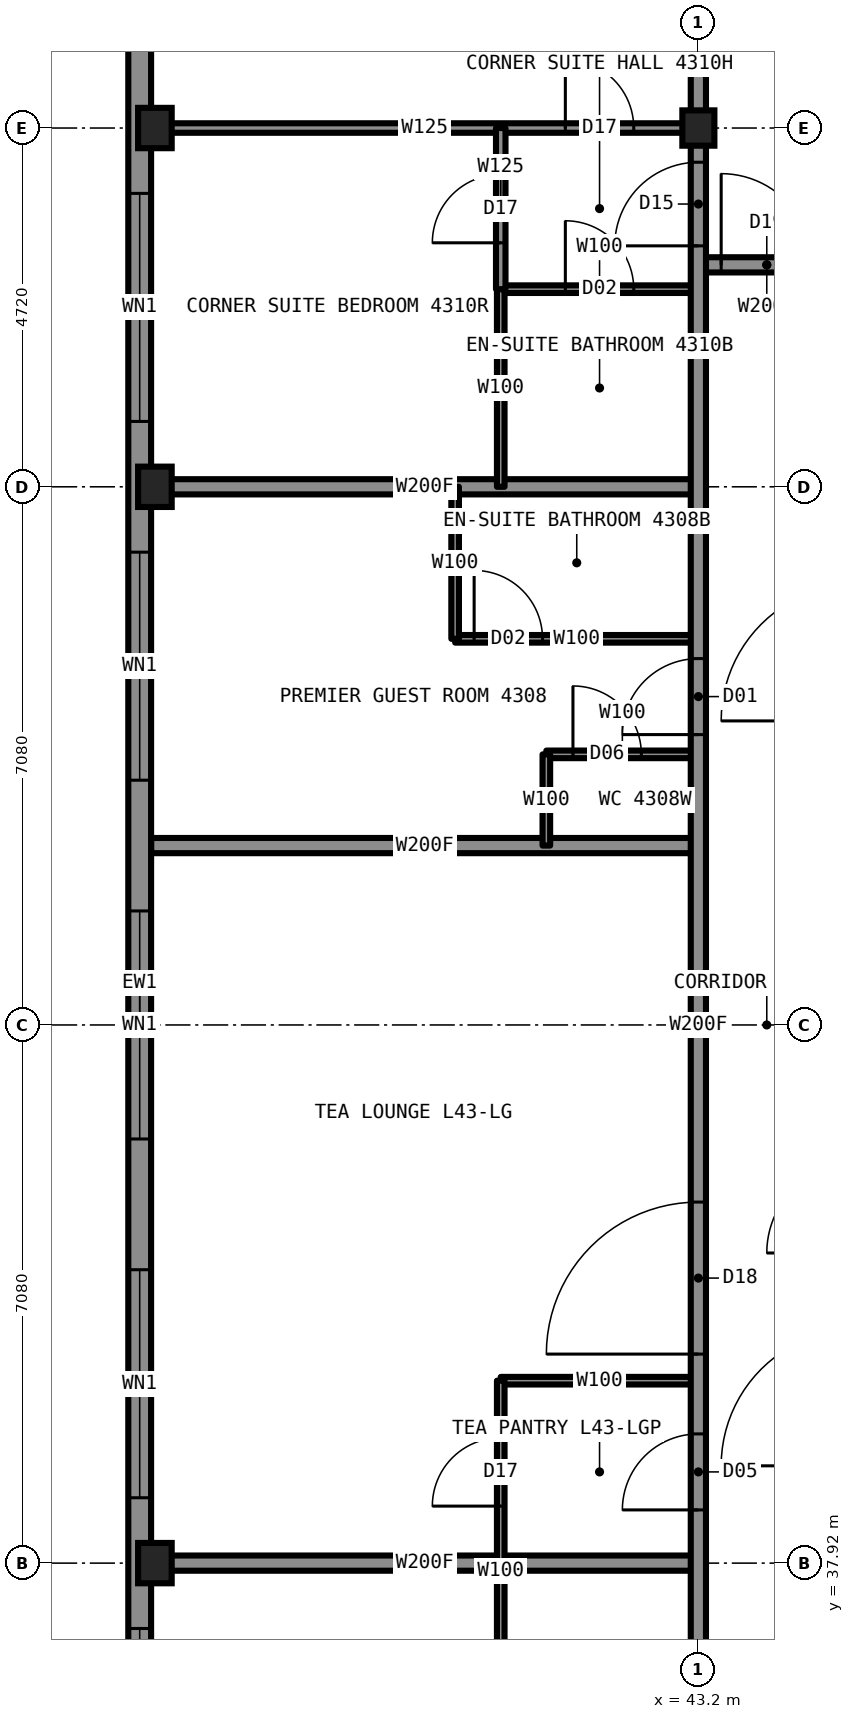
"""IFC4 building model, lengths in metres.
Left out: names, types, materials, properties, quantities, classifications, styles, units other than length and angle.
Written with IfcOpenShell. Run it as: python <this file> out.ifc"""

import sys

from ifc_helpers import new_model, si_unit, direction, frame, frame_2d, origin, origin_2d, place, context, subcontext, project, spatial, rectangle, i_section, extrude, element, fill, save


model = new_model("IFC4")
c1 = context("Model", 3, precision=1e-05, world=origin(), true_north=direction((0.0, 1.0)))
c2 = subcontext(c1, "Body", "Model", "MODEL_VIEW")
j1 = project(units=[si_unit("LENGTHUNIT", "METRE"), si_unit("PLANEANGLEUNIT", "RADIAN")], contexts=[c1])
p1 = place(None, origin())
s1 = spatial("IfcSite", under=j1, at=p1, CompositionType="ELEMENT")
p2 = place(p1, origin())
s2 = spatial("IfcBuilding", under=s1, at=p2, CompositionType="ELEMENT")
p3 = place(p2, frame((0.0, 0.0, 161.8)))
s3 = spatial("IfcBuildingStorey", under=s2, at=p3, CompositionType="ELEMENT", Elevation=161.8)
for number, where, z_axis, x_axis in (
    (1, (36.05, 37.92, 0.0), (0.0, 0.0, 1.0), (1.0, 0.0, 0.0)),
    (2, (36.05, 52.08, 0.0), (0.0, 0.0, 1.0), (1.0, 0.0, 0.0)),
    (3, (36.05, 56.8, 0.0), (0.0, 0.0, 1.0), (1.0, 0.0, 0.0)),
):
    element("IfcColumn", number, at=place(p3, frame(where, z_axis=z_axis, x_axis=x_axis)), inside=s3, PredefinedType="COLUMN", context=c2, shape_type="SweptSolid", body=[
        extrude(i_section(OverallWidth=0.442, OverallDepth=0.531, WebThickness=0.066, FlangeThickness=0.106, at=origin_2d()), origin(), (0.0, 0.0, 1.0), 3.5),
    ])
p4 = place(p3, frame((43.2, 56.8, 0.0), z_axis=(0.0, 0.0, 1.0), x_axis=(1.0, 0.0, 0.0)))
e4 = element("IfcColumn", 4, at=p4, inside=s3, PredefinedType="COLUMN", context=c2, shape_type="SweptSolid", body=[
    extrude(i_section(OverallWidth=0.422, OverallDepth=0.465, WebThickness=0.045, FlangeThickness=0.073, at=origin_2d()), origin(), (0.0, 0.0, 1.0), 3.5),
])
p5 = place(p3, frame((40.6, 40.32, 0.0), z_axis=(0.0, 0.0, 1.0), x_axis=(1.0, 0.0, 0.0)))
e5 = element("IfcWall", 5, at=p5, inside=s3, PredefinedType="PARTITIONING", context=c2, shape_type="SweptSolid", body=[
    extrude(rectangle(XDim=2.6, YDim=0.1, at=frame_2d((1.3, 0.0))), origin(), (0.0, 0.0, 1.0), 2.73),
])
p6 = place(p3, frame((36.0, 37.92, 0.0), z_axis=(0.0, 0.0, 1.0), x_axis=(1.0, 0.0, 0.0)))
e6 = element("IfcWall", 6, at=p6, inside=s3, PredefinedType="PARTITIONING", context=c2, shape_type="SweptSolid", body=[
    extrude(rectangle(XDim=7.2, YDim=0.2, at=frame_2d((3.6, 0.0))), origin(), (0.0, 0.0, 1.0), 2.573),
])
p7 = place(p3, frame((43.2, 55.0, 0.0), z_axis=(0.0, 0.0, 1.0), x_axis=(1.0, 0.0, 0.0)))
e7 = element("IfcWall", 7, at=p7, inside=s3, PredefinedType="PARTITIONING", context=c2, shape_type="SweptSolid", body=[
    extrude(rectangle(XDim=1.8, YDim=0.2, at=frame_2d((0.9, 0.0))), origin(), (0.0, 0.0, 1.0), 3.33),
])
p8 = place(p7, frame((0.3, 0.0, 0.0)))
e8 = element("IfcOpeningElement", 8, at=p8, cuts=e7, PredefinedType="OPENING", context=c2, shape_type="SweptSolid", body=[
    extrude(rectangle(XDim=1.2, YDim=2.2, at=frame_2d((0.6, 1.1))), frame((0.0, 0.11, 0.0), z_axis=(0.0, -1.0, 0.0), x_axis=(1.0, 0.0, 0.0)), (0.0, 0.0, 1.0), 0.22),
])
p9 = place(p3, frame((36.0, 56.8, 0.0), z_axis=(0.0, 0.0, 1.0), x_axis=(1.0, 0.0, 0.0)))
e9 = element("IfcWall", 9, at=p9, inside=s3, PredefinedType="PARTITIONING", context=c2, shape_type="SweptSolid", body=[
    extrude(rectangle(XDim=7.2, YDim=0.125, at=frame_2d((3.6, 0.0))), origin(), (0.0, 0.0, 1.0), 2.573),
])
p10 = place(p9, frame((5.45, 0.0, 0.0)))
e10 = element("IfcOpeningElement", 10, at=p10, cuts=e9, PredefinedType="OPENING", context=c2, shape_type="SweptSolid", body=[
    extrude(rectangle(XDim=0.9, YDim=2.2, at=frame_2d((0.45, 1.1))), frame((0.0, 0.073, 0.0), z_axis=(0.0, -1.0, 0.0), x_axis=(1.0, 0.0, 0.0)), (0.0, 0.0, 1.0), 0.145),
])
p11 = place(p3, frame((36.0, 47.36, 0.0), z_axis=(0.0, 0.0, 1.0), x_axis=(1.0, 0.0, 0.0)))
e11 = element("IfcWall", 11, at=p11, inside=s3, PredefinedType="PARTITIONING", context=c2, shape_type="SweptSolid", body=[
    extrude(rectangle(XDim=7.2, YDim=0.2, at=frame_2d((3.6, 0.0))), origin(), (0.0, 0.0, 1.0), 2.73),
])
p12 = place(p3, frame((41.2, 48.56, 0.0), z_axis=(0.0, 0.0, 1.0), x_axis=(1.0, 0.0, 0.0)))
e12 = element("IfcWall", 12, at=p12, inside=s3, PredefinedType="PARTITIONING", context=c2, shape_type="SweptSolid", body=[
    extrude(rectangle(XDim=2.0, YDim=0.1, at=frame_2d((1.0, 0.0))), origin(), (0.0, 0.0, 1.0), 3.33),
])
p13 = place(p12, frame((0.35, 0.0, 0.0)))
e13 = element("IfcOpeningElement", 13, at=p13, cuts=e12, PredefinedType="OPENING", context=c2, shape_type="SweptSolid", body=[
    extrude(rectangle(XDim=0.9, YDim=2.1, at=frame_2d((0.45, 1.05))), frame((0.0, 0.06, 0.0), z_axis=(0.0, -1.0, 0.0), x_axis=(1.0, 0.0, 0.0)), (0.0, 0.0, 1.0), 0.12),
])
p14 = place(p3, frame((40.0, 50.08, 0.0), z_axis=(0.0, 0.0, 1.0), x_axis=(1.0, 0.0, 0.0)))
e14 = element("IfcWall", 14, at=p14, inside=s3, PredefinedType="PARTITIONING", context=c2, shape_type="SweptSolid", body=[
    extrude(rectangle(XDim=3.2, YDim=0.1, at=frame_2d((1.6, 0.0))), origin(), (0.0, 0.0, 1.0), 3.33),
])
p15 = place(p14, frame((0.25, 0.0, 0.0)))
e15 = element("IfcOpeningElement", 15, at=p15, cuts=e14, PredefinedType="OPENING", context=c2, shape_type="SweptSolid", body=[
    extrude(rectangle(XDim=0.9, YDim=2.1, at=frame_2d((0.45, 1.05))), frame((0.0, 0.06, 0.0), z_axis=(0.0, -1.0, 0.0), x_axis=(1.0, 0.0, 0.0)), (0.0, 0.0, 1.0), 0.12),
])
p16 = place(p3, frame((36.0, 52.08, 0.0), z_axis=(0.0, 0.0, 1.0), x_axis=(1.0, 0.0, 0.0)))
e16 = element("IfcWall", 16, at=p16, inside=s3, PredefinedType="PARTITIONING", context=c2, shape_type="SweptSolid", body=[
    extrude(rectangle(XDim=7.2, YDim=0.2, at=frame_2d((3.6, 0.0))), origin(), (0.0, 0.0, 1.0), 2.573),
])
p17 = place(p3, frame((40.6, 54.68, 0.0), z_axis=(0.0, 0.0, 1.0), x_axis=(1.0, 0.0, 0.0)))
e17 = element("IfcWall", 17, at=p17, inside=s3, PredefinedType="PARTITIONING", context=c2, shape_type="SweptSolid", body=[
    extrude(rectangle(XDim=2.6, YDim=0.1, at=frame_2d((1.3, 0.0))), origin(), (0.0, 0.0, 1.0), 3.33),
])
p18 = place(p17, frame((0.85, 0.0, 0.0)))
e18 = element("IfcOpeningElement", 18, at=p18, cuts=e17, PredefinedType="OPENING", context=c2, shape_type="SweptSolid", body=[
    extrude(rectangle(XDim=0.9, YDim=2.1, at=frame_2d((0.45, 1.05))), frame((0.0, 0.06, 0.0), z_axis=(0.0, -1.0, 0.0), x_axis=(1.0, 0.0, 0.0)), (0.0, 0.0, 1.0), 0.12),
])
p19 = place(p3, frame((43.2, 33.22, 0.0), z_axis=(0.0, 0.0, 1.0), x_axis=(0.0, 1.0, 0.0)))
e19 = element("IfcWall", 19, at=p19, inside=s3, PredefinedType="PARTITIONING", context=c2, shape_type="SweptSolid", body=[
    extrude(rectangle(XDim=23.56, YDim=0.2, at=frame_2d((11.78, 0.0))), origin(), (0.0, 0.0, 1.0), 3.33),
])
p20 = place(p19, frame((15.6, 0.0, 0.0)))
e20 = element("IfcOpeningElement", 20, at=p20, cuts=e19, PredefinedType="OPENING", context=c2, shape_type="SweptSolid", body=[
    extrude(rectangle(XDim=1.0, YDim=2.2, at=frame_2d((0.5, 1.1))), frame((0.0, 0.11, 0.0), z_axis=(0.0, -1.0, 0.0), x_axis=(1.0, 0.0, 0.0)), (0.0, 0.0, 1.0), 0.22),
])
p21 = place(p19, frame((22.03, 0.0, 0.0)))
e21 = element("IfcOpeningElement", 21, at=p21, cuts=e19, PredefinedType="OPENING", context=c2, shape_type="SweptSolid", body=[
    extrude(rectangle(XDim=1.1, YDim=2.2, at=frame_2d((0.55, 1.1))), frame((0.0, 0.11, 0.0), z_axis=(0.0, -1.0, 0.0), x_axis=(1.0, 0.0, 0.0)), (0.0, 0.0, 1.0), 0.22),
])
p22 = place(p19, frame((0.64, 0.0, 0.0)))
e22 = element("IfcOpeningElement", 22, at=p22, cuts=e19, PredefinedType="OPENING", context=c2, shape_type="SweptSolid", body=[
    extrude(rectangle(XDim=1.1, YDim=2.2, at=frame_2d((0.55, 1.1))), frame((0.0, 0.11, 0.0), z_axis=(0.0, -1.0, 0.0), x_axis=(1.0, 0.0, 0.0)), (0.0, 0.0, 1.0), 0.22),
])
p23 = place(p19, frame((7.45, 0.0, 0.0)))
e23 = element("IfcOpeningElement", 23, at=p23, cuts=e19, PredefinedType="OPENING", context=c2, shape_type="SweptSolid", body=[
    extrude(rectangle(XDim=2.0, YDim=2.4, at=frame_2d((1.0, 1.2))), frame((0.0, 0.11, 0.0), z_axis=(0.0, -1.0, 0.0), x_axis=(1.0, 0.0, 0.0)), (0.0, 0.0, 1.0), 0.22),
])
p24 = place(p19, frame((5.4, 0.0, 0.0)))
e24 = element("IfcOpeningElement", 24, at=p24, cuts=e19, PredefinedType="OPENING", context=c2, shape_type="SweptSolid", body=[
    extrude(rectangle(XDim=1.0, YDim=2.1, at=frame_2d((0.5, 1.05))), frame((0.0, 0.11, 0.0), z_axis=(0.0, -1.0, 0.0), x_axis=(1.0, 0.0, 0.0)), (0.0, 0.0, 1.0), 0.22),
])
p25 = place(p3, frame((41.2, 47.36, 0.0), z_axis=(0.0, 0.0, 1.0), x_axis=(0.0, 1.0, 0.0)))
e25 = element("IfcWall", 25, at=p25, inside=s3, PredefinedType="PARTITIONING", context=c2, shape_type="SweptSolid", body=[
    extrude(rectangle(XDim=1.2, YDim=0.1, at=frame_2d((0.6, 0.0))), origin(), (0.0, 0.0, 1.0), 3.33),
])
p26 = place(p3, frame((40.6, 35.32, 0.0), z_axis=(0.0, 0.0, 1.0), x_axis=(0.0, 1.0, 0.0)))
e26 = element("IfcWall", 26, at=p26, inside=s3, PredefinedType="PARTITIONING", context=c2, shape_type="SweptSolid", body=[
    extrude(rectangle(XDim=5.0, YDim=0.1, at=frame_2d((2.5, 0.0))), origin(), (0.0, 0.0, 1.0), 3.33),
])
p27 = place(p26, frame((3.35, 0.0, 0.0)))
e27 = element("IfcOpeningElement", 27, at=p27, cuts=e26, PredefinedType="OPENING", context=c2, shape_type="SweptSolid", body=[
    extrude(rectangle(XDim=0.9, YDim=2.2, at=frame_2d((0.45, 1.1))), frame((0.0, 0.06, 0.0), z_axis=(0.0, -1.0, 0.0), x_axis=(1.0, 0.0, 0.0)), (0.0, 0.0, 1.0), 0.12),
])
p28 = place(p3, frame((40.6, 52.08, 0.0), z_axis=(0.0, 0.0, 1.0), x_axis=(0.0, 1.0, 0.0)))
e28 = element("IfcWall", 28, at=p28, inside=s3, PredefinedType="PARTITIONING", context=c2, shape_type="SweptSolid", body=[
    extrude(rectangle(XDim=2.6, YDim=0.1, at=frame_2d((1.3, 0.0))), origin(), (0.0, 0.0, 1.0), 3.33),
])
p29 = place(p3, frame((40.6, 54.68, 0.0), z_axis=(0.0, 0.0, 1.0), x_axis=(0.0, 1.0, 0.0)))
e29 = element("IfcWall", 29, at=p29, inside=s3, PredefinedType="PARTITIONING", context=c2, shape_type="SweptSolid", body=[
    extrude(rectangle(XDim=2.12, YDim=0.125, at=frame_2d((1.06, 0.0))), origin(), (0.0, 0.0, 1.0), 3.33),
])
p30 = place(p29, frame((0.61, 0.0, 0.0)))
e30 = element("IfcOpeningElement", 30, at=p30, cuts=e29, PredefinedType="OPENING", context=c2, shape_type="SweptSolid", body=[
    extrude(rectangle(XDim=0.9, YDim=2.2, at=frame_2d((0.45, 1.1))), frame((0.0, 0.073, 0.0), z_axis=(0.0, -1.0, 0.0), x_axis=(1.0, 0.0, 0.0)), (0.0, 0.0, 1.0), 0.145),
])
p31 = place(p3, frame((40.0, 50.08, 0.0), z_axis=(0.0, 0.0, 1.0), x_axis=(0.0, 1.0, 0.0)))
e31 = element("IfcWall", 31, at=p31, inside=s3, PredefinedType="PARTITIONING", context=c2, shape_type="SweptSolid", body=[
    extrude(rectangle(XDim=2.0, YDim=0.1, at=frame_2d((1.0, 0.0))), origin(), (0.0, 0.0, 1.0), 3.33),
])
p32 = place(p3, frame((35.85, 58.8, 0.0), z_axis=(0.0, 0.0, 1.0), x_axis=(0.0, -1.0, 0.0)))
e32 = element("IfcWall", 32, at=p32, inside=s3, PredefinedType="SOLIDWALL", context=c2, shape_type="SweptSolid", body=[
    extrude(rectangle(XDim=27.6, YDim=0.3, at=frame_2d((13.8, 0.0))), origin(), (0.0, 0.0, 1.0), 2.83),
])
p33 = place(p32, frame((2.86, 0.0, 0.3)))
e33 = element("IfcOpeningElement", 33, at=p33, cuts=e32, PredefinedType="OPENING", context=c2, shape_type="SweptSolid", body=[
    extrude(rectangle(XDim=3.0, YDim=2.0, at=frame_2d((1.5, 1.0))), frame((0.0, 0.16, 0.0), z_axis=(0.0, -1.0, 0.0), x_axis=(1.0, 0.0, 0.0)), (0.0, 0.0, 1.0), 0.32),
])
p34 = place(p32, frame((7.58, 0.0, 0.3)))
e34 = element("IfcOpeningElement", 34, at=p34, cuts=e32, PredefinedType="OPENING", context=c2, shape_type="SweptSolid", body=[
    extrude(rectangle(XDim=3.0, YDim=2.0, at=frame_2d((1.5, 1.0))), frame((0.0, 0.16, 0.0), z_axis=(0.0, -1.0, 0.0), x_axis=(1.0, 0.0, 0.0)), (0.0, 0.0, 1.0), 0.32),
])
p35 = place(p32, frame((12.3, 0.0, 0.3)))
e35 = element("IfcOpeningElement", 35, at=p35, cuts=e32, PredefinedType="OPENING", context=c2, shape_type="SweptSolid", body=[
    extrude(rectangle(XDim=3.0, YDim=2.0, at=frame_2d((1.5, 1.0))), frame((0.0, 0.16, 0.0), z_axis=(0.0, -1.0, 0.0), x_axis=(1.0, 0.0, 0.0)), (0.0, 0.0, 1.0), 0.32),
])
p36 = place(p32, frame((17.02, 0.0, 0.3)))
e36 = element("IfcOpeningElement", 36, at=p36, cuts=e32, PredefinedType="OPENING", context=c2, shape_type="SweptSolid", body=[
    extrude(rectangle(XDim=3.0, YDim=2.0, at=frame_2d((1.5, 1.0))), frame((0.0, 0.16, 0.0), z_axis=(0.0, -1.0, 0.0), x_axis=(1.0, 0.0, 0.0)), (0.0, 0.0, 1.0), 0.32),
])
p37 = place(p32, frame((21.74, 0.0, 0.3)))
e37 = element("IfcOpeningElement", 37, at=p37, cuts=e32, PredefinedType="OPENING", context=c2, shape_type="SweptSolid", body=[
    extrude(rectangle(XDim=3.0, YDim=2.0, at=frame_2d((1.5, 1.0))), frame((0.0, 0.16, 0.0), z_axis=(0.0, -1.0, 0.0), x_axis=(1.0, 0.0, 0.0)), (0.0, 0.0, 1.0), 0.32),
])
p38 = place(p3, frame((43.2, 56.78, 0.0), z_axis=(0.0, 0.0, 1.0), x_axis=(0.0, 1.0, 0.0)))
e38 = element("IfcWall", 38, at=p38, inside=s3, PredefinedType="PARTITIONING", context=c2, shape_type="SweptSolid", body=[
    extrude(rectangle(XDim=2.82, YDim=0.2, at=frame_2d((1.41, 0.0))), origin(), (0.0, 0.0, 1.0), 2.573),
])
p39 = place(p8, origin())
e39 = element("IfcDoor", 39, at=p39, inside=s3, OperationType="SINGLE_SWING_LEFT", PredefinedType="DOOR", context=c2, shape_type="SweptSolid", body=[
    extrude(rectangle(XDim=1.2, YDim=2.2, at=frame_2d((0.6, 1.1))), frame((0.0, 0.025, 0.0), z_axis=(0.0, -1.0, 0.0), x_axis=(1.0, 0.0, 0.0)), (0.0, 0.0, 1.0), 0.05),
])
fill(e8, e39)
p40 = place(p20, origin())
e40 = element("IfcDoor", 40, at=p40, inside=s3, OperationType="SINGLE_SWING_LEFT", PredefinedType="DOOR", context=c2, shape_type="SweptSolid", body=[
    extrude(rectangle(XDim=1.0, YDim=2.2, at=frame_2d((0.5, 1.1))), frame((0.0, 0.025, 0.0), z_axis=(0.0, -1.0, 0.0), x_axis=(1.0, 0.0, 0.0)), (0.0, 0.0, 1.0), 0.05),
])
fill(e20, e40)
p41 = place(p15, origin())
e41 = element("IfcDoor", 41, at=p41, inside=s3, OperationType="SINGLE_SWING_RIGHT", PredefinedType="DOOR", context=c2, shape_type="SweptSolid", body=[
    extrude(rectangle(XDim=0.9, YDim=2.1, at=frame_2d((0.45, 1.05))), frame((0.0, 0.025, 0.0), z_axis=(0.0, -1.0, 0.0), x_axis=(1.0, 0.0, 0.0)), (0.0, 0.0, 1.0), 0.05),
])
fill(e15, e41)
p42 = place(p13, origin())
e42 = element("IfcDoor", 42, at=p42, inside=s3, OperationType="SINGLE_SWING_LEFT", PredefinedType="DOOR", context=c2, shape_type="SweptSolid", body=[
    extrude(rectangle(XDim=0.9, YDim=2.1, at=frame_2d((0.45, 1.05))), frame((0.0, 0.025, 0.0), z_axis=(0.0, -1.0, 0.0), x_axis=(1.0, 0.0, 0.0)), (0.0, 0.0, 1.0), 0.05),
])
fill(e13, e42)
p43 = place(p10, origin())
e43 = element("IfcDoor", 43, at=p43, inside=s3, OperationType="SINGLE_SWING_LEFT", PredefinedType="DOOR", context=c2, shape_type="SweptSolid", body=[
    extrude(rectangle(XDim=0.9, YDim=2.2, at=frame_2d((0.45, 1.1))), frame((0.0, 0.025, 0.0), z_axis=(0.0, -1.0, 0.0), x_axis=(1.0, 0.0, 0.0)), (0.0, 0.0, 1.0), 0.05),
])
fill(e10, e43)
p44 = place(p18, origin())
e44 = element("IfcDoor", 44, at=p44, inside=s3, OperationType="SINGLE_SWING_RIGHT", PredefinedType="DOOR", context=c2, shape_type="SweptSolid", body=[
    extrude(rectangle(XDim=0.9, YDim=2.1, at=frame_2d((0.45, 1.05))), frame((0.0, 0.025, 0.0), z_axis=(0.0, -1.0, 0.0), x_axis=(1.0, 0.0, 0.0)), (0.0, 0.0, 1.0), 0.05),
])
fill(e18, e44)
p45 = place(p21, origin())
e45 = element("IfcDoor", 45, at=p45, inside=s3, OperationType="SINGLE_SWING_LEFT", PredefinedType="DOOR", context=c2, shape_type="SweptSolid", body=[
    extrude(rectangle(XDim=1.1, YDim=2.2, at=frame_2d((0.55, 1.1))), frame((0.0, 0.025, 0.0), z_axis=(0.0, -1.0, 0.0), x_axis=(1.0, 0.0, 0.0)), (0.0, 0.0, 1.0), 0.05),
])
fill(e21, e45)
p46 = place(p30, origin())
e46 = element("IfcDoor", 46, at=p46, inside=s3, OperationType="SINGLE_SWING_LEFT", PredefinedType="DOOR", context=c2, shape_type="SweptSolid", body=[
    extrude(rectangle(XDim=0.9, YDim=2.2, at=frame_2d((0.45, 1.1))), frame((0.0, 0.025, 0.0), z_axis=(0.0, -1.0, 0.0), x_axis=(1.0, 0.0, 0.0)), (0.0, 0.0, 1.0), 0.05),
])
fill(e30, e46)
p47 = place(p23, origin())
e47 = element("IfcDoor", 47, at=p47, inside=s3, OperationType="DOUBLE_DOOR_SINGLE_SWING", PredefinedType="DOOR", context=c2, shape_type="SweptSolid", body=[
    extrude(rectangle(XDim=2.0, YDim=2.4, at=frame_2d((1.0, 1.2))), frame((0.0, 0.025, 0.0), z_axis=(0.0, -1.0, 0.0), x_axis=(1.0, 0.0, 0.0)), (0.0, 0.0, 1.0), 0.05),
])
fill(e23, e47)
p48 = place(p27, origin())
e48 = element("IfcDoor", 48, at=p48, inside=s3, OperationType="SINGLE_SWING_LEFT", PredefinedType="DOOR", context=c2, shape_type="SweptSolid", body=[
    extrude(rectangle(XDim=0.9, YDim=2.2, at=frame_2d((0.45, 1.1))), frame((0.0, 0.025, 0.0), z_axis=(0.0, -1.0, 0.0), x_axis=(1.0, 0.0, 0.0)), (0.0, 0.0, 1.0), 0.05),
])
fill(e27, e48)
p49 = place(p24, origin())
e49 = element("IfcDoor", 49, at=p49, inside=s3, OperationType="SINGLE_SWING_LEFT", PredefinedType="DOOR", context=c2, shape_type="SweptSolid", body=[
    extrude(rectangle(XDim=1.0, YDim=2.1, at=frame_2d((0.5, 1.05))), frame((0.0, 0.025, 0.0), z_axis=(0.0, -1.0, 0.0), x_axis=(1.0, 0.0, 0.0)), (0.0, 0.0, 1.0), 0.05),
])
fill(e24, e49)
p50 = place(p33, origin())
e50 = element("IfcWindow", 50, at=p50, inside=s3, PartitioningType="SINGLE_PANEL", PredefinedType="WINDOW", context=c2, shape_type="SweptSolid", body=[
    extrude(rectangle(XDim=3.0, YDim=2.0, at=frame_2d((1.5, 1.0))), frame((0.0, 0.13, 0.0), z_axis=(0.0, -1.0, 0.0), x_axis=(1.0, 0.0, 0.0)), (0.0, 0.0, 1.0), 0.06),
])
fill(e33, e50)
p51 = place(p34, origin())
e51 = element("IfcWindow", 51, at=p51, inside=s3, PartitioningType="SINGLE_PANEL", PredefinedType="WINDOW", context=c2, shape_type="SweptSolid", body=[
    extrude(rectangle(XDim=3.0, YDim=2.0, at=frame_2d((1.5, 1.0))), frame((0.0, 0.13, 0.0), z_axis=(0.0, -1.0, 0.0), x_axis=(1.0, 0.0, 0.0)), (0.0, 0.0, 1.0), 0.06),
])
fill(e34, e51)
p52 = place(p35, origin())
e52 = element("IfcWindow", 52, at=p52, inside=s3, PartitioningType="SINGLE_PANEL", PredefinedType="WINDOW", context=c2, shape_type="SweptSolid", body=[
    extrude(rectangle(XDim=3.0, YDim=2.0, at=frame_2d((1.5, 1.0))), frame((0.0, 0.13, 0.0), z_axis=(0.0, -1.0, 0.0), x_axis=(1.0, 0.0, 0.0)), (0.0, 0.0, 1.0), 0.06),
])
fill(e35, e52)
p53 = place(p36, origin())
e53 = element("IfcWindow", 53, at=p53, inside=s3, PartitioningType="SINGLE_PANEL", PredefinedType="WINDOW", context=c2, shape_type="SweptSolid", body=[
    extrude(rectangle(XDim=3.0, YDim=2.0, at=frame_2d((1.5, 1.0))), frame((0.0, 0.13, 0.0), z_axis=(0.0, -1.0, 0.0), x_axis=(1.0, 0.0, 0.0)), (0.0, 0.0, 1.0), 0.06),
])
fill(e36, e53)
p54 = place(p37, origin())
e54 = element("IfcWindow", 54, at=p54, inside=s3, PartitioningType="SINGLE_PANEL", PredefinedType="WINDOW", context=c2, shape_type="SweptSolid", body=[
    extrude(rectangle(XDim=3.0, YDim=2.0, at=frame_2d((1.5, 1.0))), frame((0.0, 0.13, 0.0), z_axis=(0.0, -1.0, 0.0), x_axis=(1.0, 0.0, 0.0)), (0.0, 0.0, 1.0), 0.06),
])
fill(e37, e54)
save(model, sys.argv[1])
